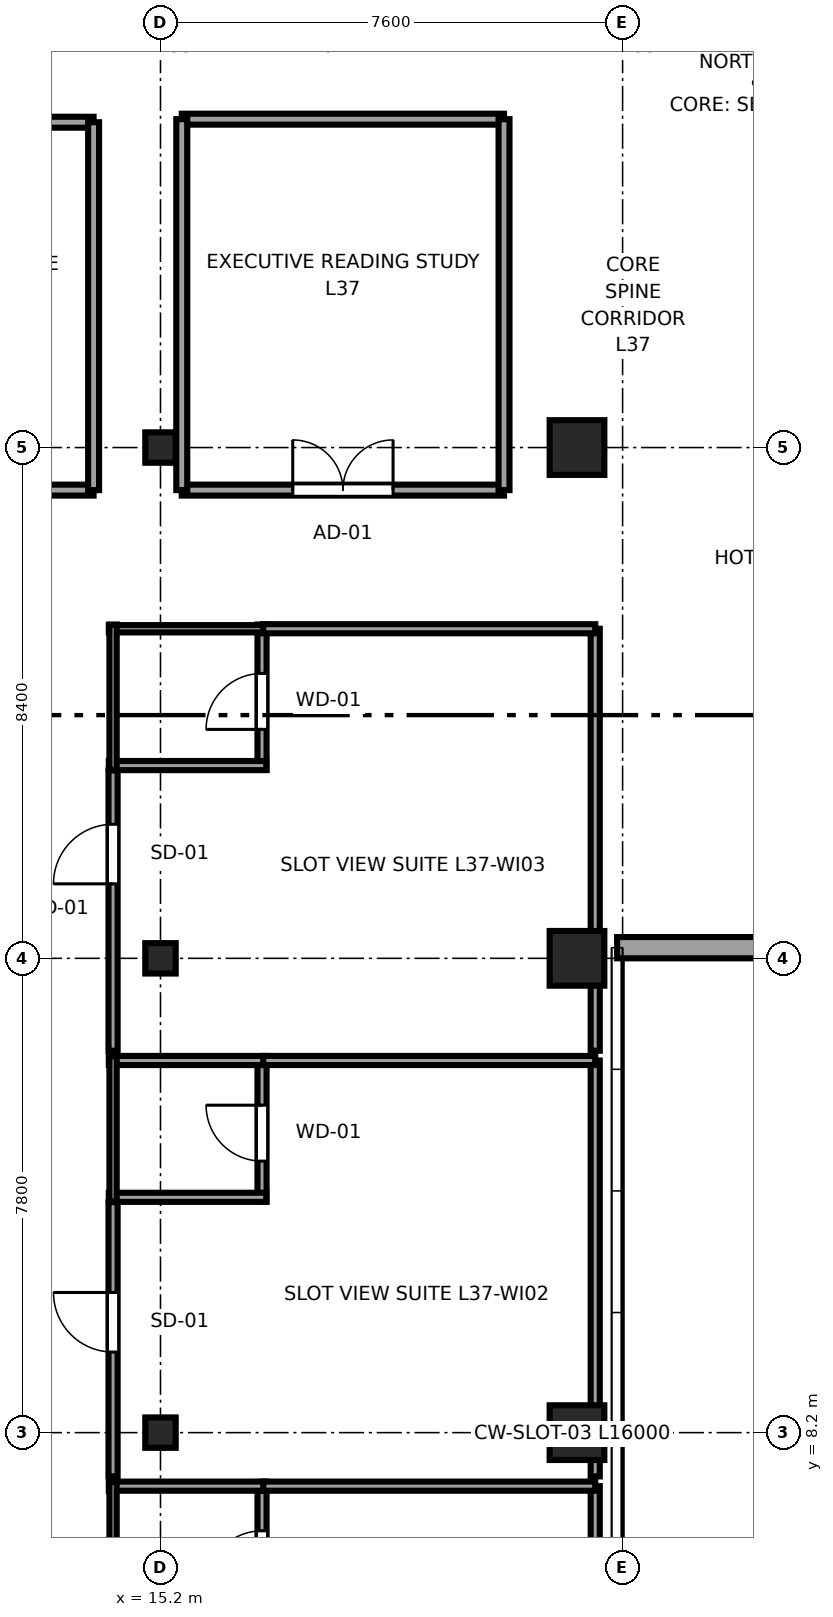
"""IFC4 building model, lengths in metres.
Left out: names, types, materials, properties, quantities, classifications, styles, units other than length and angle.
Written with IfcOpenShell. Run it as: python <this file> out.ifc"""

import sys

from ifc_helpers import new_model, si_unit, direction, frame, frame_2d, origin, origin_2d, place, context, subcontext, project, spatial, rectangle, i_section, extrude, source, transform, mapped, element, fill, save


model = new_model("IFC4")
c1 = context("Model", 3, precision=1e-05, world=origin(), true_north=direction((0.0, 1.0)))
c2 = subcontext(c1, "Body", "Model", "MODEL_VIEW")
j1 = project(units=[si_unit("LENGTHUNIT", "METRE"), si_unit("PLANEANGLEUNIT", "RADIAN")], contexts=[c1])
p1 = place(None, origin())
s1 = spatial("IfcSite", under=j1, at=p1, CompositionType="ELEMENT")
p2 = place(p1, origin())
s2 = spatial("IfcBuilding", under=s1, at=p2, CompositionType="ELEMENT")
p3 = place(p2, frame((0.0, 0.0, 143.5)))
s3 = spatial("IfcBuildingStorey", under=s2, at=p3, CompositionType="ELEMENT", Elevation=143.5)
m1 = source(origin(), c2, "Body", "SweptSolid", [
    extrude(i_section(OverallWidth=0.5, OverallDepth=0.5, WebThickness=0.022, FlangeThickness=0.034, at=origin_2d()), origin(), (0.0, 0.0, 1.0), 3.55),
])
for number, where, z_axis, x_axis in (
    (1, (15.2, 8.2, 0.0), (0.0, 0.0, 1.0), (1.0, 0.0, 0.0)),
    (2, (15.2, 16.0, 0.0), (0.0, 0.0, 1.0), (1.0, 0.0, 0.0)),
    (3, (15.2, 24.4, 0.0), (0.0, 0.0, 1.0), (1.0, 0.0, 0.0)),
):
    element("IfcColumn", number, at=place(p3, frame(where, z_axis=z_axis, x_axis=x_axis)), inside=s3, PredefinedType="COLUMN", context=c2, shape_type="MappedRepresentation", body=[
        mapped(m1, transform((0.0, 0.0, 0.0), x_axis=(1.0, 0.0, 0.0), y_axis=(0.0, 1.0, 0.0), z_axis=(0.0, 0.0, 1.0), scale=1.0)),
    ])
m2 = source(origin(), c2, "Body", "SweptSolid", [
    extrude(rectangle(XDim=0.9, YDim=0.9, at=origin_2d()), origin(), (0.0, 0.0, 1.0), 3.55),
])
for number, where, z_axis, x_axis in (
    (4, (22.05, 8.2, 0.0), (0.0, 0.0, 1.0), (1.0, 0.0, 0.0)),
    (5, (22.05, 16.0, 0.0), (0.0, 0.0, 1.0), (1.0, 0.0, 0.0)),
    (6, (22.05, 24.4, 0.0), (0.0, 0.0, 1.0), (1.0, 0.0, 0.0)),
):
    element("IfcColumn", number, at=place(p3, frame(where, z_axis=z_axis, x_axis=x_axis)), inside=s3, PredefinedType="COLUMN", context=c2, shape_type="MappedRepresentation", body=[
        mapped(m2, transform((0.0, 0.0, 0.0), x_axis=(1.0, 0.0, 0.0), y_axis=(0.0, 1.0, 0.0), z_axis=(0.0, 0.0, 1.0), scale=1.0)),
    ])
p4 = place(p3, frame((22.71, 16.175, 0.0), z_axis=(0.0, 0.0, 1.0), x_axis=(1.0, 0.0, 0.0)))
e7 = element("IfcWall", 7, at=p4, inside=s3, PredefinedType="SOLIDWALL", context=c2, shape_type="SweptSolid", body=[
    extrude(rectangle(XDim=11.58, YDim=0.35, at=frame_2d((5.79, 0.0))), origin(), (0.0, 0.0, 1.0), 2.08),
])
p5 = place(p3, frame((16.87, 5.0, 0.0), z_axis=(0.0, 0.0, 1.0), x_axis=(0.0, 1.0, 0.0)))
e8 = element("IfcWall", 8, at=p5, inside=s3, PredefinedType="PARTITIONING", context=c2, shape_type="SweptSolid", body=[
    extrude(rectangle(XDim=2.39, YDim=0.15, at=frame_2d((1.195, 0.0))), origin(), (0.0, 0.0, 1.0), 3.29),
])
p6 = place(p5, frame((0.665, 0.0, 0.0)))
e9 = element("IfcOpeningElement", 9, at=p6, cuts=e8, PredefinedType="OPENING", context=c2, shape_type="SweptSolid", body=[
    extrude(rectangle(XDim=0.92, YDim=2.01, at=frame_2d((0.46, 1.005))), frame((0.0, 0.085, 0.0), z_axis=(0.0, -1.0, 0.0), x_axis=(1.0, 0.0, 0.0)), (0.0, 0.0, 1.0), 0.17),
])
p7 = place(p3, frame((14.35, 7.32, 0.0), z_axis=(0.0, 0.0, 1.0), x_axis=(1.0, 0.0, 0.0)))
e10 = element("IfcWall", 10, at=p7, inside=s3, PredefinedType="PARTITIONING", context=c2, shape_type="SweptSolid", body=[
    extrude(rectangle(XDim=2.59, YDim=0.15, at=frame_2d((1.295, 0.0))), origin(), (0.0, 0.0, 1.0), 3.29),
])
p8 = place(p3, frame((14.42, 5.0, 0.0), z_axis=(0.0, 0.0, 1.0), x_axis=(0.0, 1.0, 0.0)))
e11 = element("IfcWall", 11, at=p8, inside=s3, PredefinedType="PLUMBINGWALL", context=c2, shape_type="SweptSolid", body=[
    extrude(rectangle(XDim=2.39, YDim=0.12, at=frame_2d((1.195, 0.0))), origin(), (0.0, 0.0, 1.0), 3.29),
])
p9 = place(p3, frame((16.87, 12.0, 0.0), z_axis=(0.0, 0.0, 1.0), x_axis=(0.0, 1.0, 0.0)))
e12 = element("IfcWall", 12, at=p9, inside=s3, PredefinedType="PARTITIONING", context=c2, shape_type="SweptSolid", body=[
    extrude(rectangle(XDim=2.39, YDim=0.15, at=frame_2d((1.195, 0.0))), origin(), (0.0, 0.0, 1.0), 3.29),
])
p10 = place(p9, frame((0.665, 0.0, 0.0)))
e13 = element("IfcOpeningElement", 13, at=p10, cuts=e12, PredefinedType="OPENING", context=c2, shape_type="SweptSolid", body=[
    extrude(rectangle(XDim=0.92, YDim=2.01, at=frame_2d((0.46, 1.005))), frame((0.0, 0.085, 0.0), z_axis=(0.0, -1.0, 0.0), x_axis=(1.0, 0.0, 0.0)), (0.0, 0.0, 1.0), 0.17),
])
for number, where, z_axis, x_axis in (
    (14, (14.35, 12.07, 0.0), (0.0, 0.0, 1.0), (1.0, 0.0, 0.0)),
    (15, (14.35, 14.32, 0.0), (0.0, 0.0, 1.0), (1.0, 0.0, 0.0)),
):
    element("IfcWall", number, at=place(p3, frame(where, z_axis=z_axis, x_axis=x_axis)), inside=s3, PredefinedType="PARTITIONING", context=c2, shape_type="SweptSolid", body=[
        extrude(rectangle(XDim=2.59, YDim=0.15, at=frame_2d((1.295, 0.0))), origin(), (0.0, 0.0, 1.0), 3.29),
    ])
p11 = place(p3, frame((14.42, 12.0, 0.0), z_axis=(0.0, 0.0, 1.0), x_axis=(0.0, 1.0, 0.0)))
e16 = element("IfcWall", 16, at=p11, inside=s3, PredefinedType="PLUMBINGWALL", context=c2, shape_type="SweptSolid", body=[
    extrude(rectangle(XDim=2.39, YDim=0.12, at=frame_2d((1.195, 0.0))), origin(), (0.0, 0.0, 1.0), 3.29),
])
p12 = place(p3, frame((16.87, 19.1, 0.0), z_axis=(0.0, 0.0, 1.0), x_axis=(0.0, 1.0, 0.0)))
e17 = element("IfcWall", 17, at=p12, inside=s3, PredefinedType="PARTITIONING", context=c2, shape_type="SweptSolid", body=[
    extrude(rectangle(XDim=2.39, YDim=0.15, at=frame_2d((1.195, 0.0))), origin(), (0.0, 0.0, 1.0), 3.29),
])
p13 = place(p12, frame((0.665, 0.0, 0.0)))
e18 = element("IfcOpeningElement", 18, at=p13, cuts=e17, PredefinedType="OPENING", context=c2, shape_type="SweptSolid", body=[
    extrude(rectangle(XDim=0.92, YDim=2.01, at=frame_2d((0.46, 1.005))), frame((0.0, 0.085, 0.0), z_axis=(0.0, -1.0, 0.0), x_axis=(1.0, 0.0, 0.0)), (0.0, 0.0, 1.0), 0.17),
])
p14 = place(p3, frame((14.35, 19.17, 0.0), z_axis=(0.0, 0.0, 1.0), x_axis=(1.0, 0.0, 0.0)))
e19 = element("IfcWall", 19, at=p14, inside=s3, PredefinedType="PARTITIONING", context=c2, shape_type="SweptSolid", body=[
    extrude(rectangle(XDim=2.59, YDim=0.15, at=frame_2d((1.295, 0.0))), origin(), (0.0, 0.0, 1.0), 3.29),
])
p15 = place(p3, frame((14.35, 21.42, 0.0), z_axis=(0.0, 0.0, 1.0), x_axis=(1.0, 0.0, 0.0)))
e20 = element("IfcWall", 20, at=p15, inside=s3, PredefinedType="PLUMBINGWALL", context=c2, shape_type="SweptSolid", body=[
    extrude(rectangle(XDim=2.59, YDim=0.12, at=frame_2d((1.295, 0.0))), origin(), (0.0, 0.0, 1.0), 3.29),
])
p16 = place(p3, frame((14.42, 19.1, 0.0), z_axis=(0.0, 0.0, 1.0), x_axis=(0.0, 1.0, 0.0)))
e21 = element("IfcWall", 21, at=p16, inside=s3, PredefinedType="PLUMBINGWALL", context=c2, shape_type="SweptSolid", body=[
    extrude(rectangle(XDim=2.39, YDim=0.12, at=frame_2d((1.195, 0.0))), origin(), (0.0, 0.0, 1.0), 3.29),
])
p17 = place(p3, frame((22.35, 0.405, 0.0), z_axis=(0.0, 0.0, 1.0), x_axis=(0.0, 1.0, 0.0)))
e22 = element("IfcWall", 22, at=p17, inside=s3, PredefinedType="PARTITIONING", context=c2, shape_type="SweptSolid", body=[
    extrude(rectangle(XDim=6.915, YDim=0.15, at=frame_2d((3.458, 0.0))), origin(), (0.0, 0.0, 1.0), 2.08),
])
p18 = place(p3, frame((16.89, 7.32, 0.0), z_axis=(0.0, 0.0, 1.0), x_axis=(1.0, 0.0, 0.0)))
e23 = element("IfcWall", 23, at=p18, inside=s3, PredefinedType="PARTITIONING", context=c2, shape_type="SweptSolid", body=[
    extrude(rectangle(XDim=5.46, YDim=0.15, at=frame_2d((2.73, 0.0))), origin(), (0.0, 0.0, 1.0), 3.29),
])
p19 = place(p3, frame((14.42, 7.48, 0.0), z_axis=(0.0, 0.0, 1.0), x_axis=(0.0, 1.0, 0.0)))
e24 = element("IfcWall", 24, at=p19, inside=s3, PredefinedType="PARTITIONING", context=c2, shape_type="SweptSolid", body=[
    extrude(rectangle(XDim=4.51, YDim=0.15, at=frame_2d((2.255, 0.0))), origin(), (0.0, 0.0, 1.0), 3.29),
])
p20 = place(p19, frame((2.045, 0.0, 0.0)))
e25 = element("IfcOpeningElement", 25, at=p20, cuts=e24, PredefinedType="OPENING", context=c2, shape_type="SweptSolid", body=[
    extrude(rectangle(XDim=0.98, YDim=2.12, at=frame_2d((0.49, 1.06))), frame((0.0, 0.085, 0.0), z_axis=(0.0, -1.0, 0.0), x_axis=(1.0, 0.0, 0.0)), (0.0, 0.0, 1.0), 0.17),
])
p21 = place(p3, frame((22.35, 7.48, 0.0), z_axis=(0.0, 0.0, 1.0), x_axis=(0.0, 1.0, 0.0)))
e26 = element("IfcWall", 26, at=p21, inside=s3, PredefinedType="PARTITIONING", context=c2, shape_type="SweptSolid", body=[
    extrude(rectangle(XDim=6.84, YDim=0.15, at=frame_2d((3.42, 0.0))), origin(), (0.0, 0.0, 1.0), 2.08),
])
p22 = place(p3, frame((16.89, 14.32, 0.0), z_axis=(0.0, 0.0, 1.0), x_axis=(1.0, 0.0, 0.0)))
e27 = element("IfcWall", 27, at=p22, inside=s3, PredefinedType="PARTITIONING", context=c2, shape_type="SweptSolid", body=[
    extrude(rectangle(XDim=5.46, YDim=0.15, at=frame_2d((2.73, 0.0))), origin(), (0.0, 0.0, 1.0), 3.29),
])
p23 = place(p3, frame((14.42, 14.48, 0.0), z_axis=(0.0, 0.0, 1.0), x_axis=(0.0, 1.0, 0.0)))
e28 = element("IfcWall", 28, at=p23, inside=s3, PredefinedType="PARTITIONING", context=c2, shape_type="SweptSolid", body=[
    extrude(rectangle(XDim=4.61, YDim=0.15, at=frame_2d((2.305, 0.0))), origin(), (0.0, 0.0, 1.0), 3.29),
])
p24 = place(p23, frame((2.745, 0.0, 0.0)))
e29 = element("IfcOpeningElement", 29, at=p24, cuts=e28, PredefinedType="OPENING", context=c2, shape_type="SweptSolid", body=[
    extrude(rectangle(XDim=0.98, YDim=2.12, at=frame_2d((0.49, 1.06))), frame((0.0, 0.085, 0.0), z_axis=(0.0, -1.0, 0.0), x_axis=(1.0, 0.0, 0.0)), (0.0, 0.0, 1.0), 0.17),
])
p25 = place(p3, frame((22.35, 14.48, 0.0), z_axis=(0.0, 0.0, 1.0), x_axis=(0.0, 1.0, 0.0)))
e30 = element("IfcWall", 30, at=p25, inside=s3, PredefinedType="PARTITIONING", context=c2, shape_type="SweptSolid", body=[
    extrude(rectangle(XDim=6.94, YDim=0.15, at=frame_2d((3.47, 0.0))), origin(), (0.0, 0.0, 1.0), 2.08),
])
p26 = place(p3, frame((16.89, 21.42, 0.0), z_axis=(0.0, 0.0, 1.0), x_axis=(1.0, 0.0, 0.0)))
e31 = element("IfcWall", 31, at=p26, inside=s3, PredefinedType="PARTITIONING", context=c2, shape_type="SweptSolid", body=[
    extrude(rectangle(XDim=5.46, YDim=0.15, at=frame_2d((2.73, 0.0))), origin(), (0.0, 0.0, 1.0), 3.29),
])
p27 = place(p3, frame((9.88, 23.7, 0.0), z_axis=(0.0, 0.0, 1.0), x_axis=(1.0, 0.0, 0.0)))
e32 = element("IfcWall", 32, at=p27, inside=s3, PredefinedType="PARTITIONING", context=c2, shape_type="SweptSolid", body=[
    extrude(rectangle(XDim=4.22, YDim=0.18, at=frame_2d((2.11, 0.0))), origin(), (0.0, 0.0, 1.0), 3.29),
])
p28 = place(p27, frame((1.285, 0.0, 0.0)))
e33 = element("IfcOpeningElement", 33, at=p28, cuts=e32, PredefinedType="OPENING", context=c2, shape_type="SweptSolid", body=[
    extrude(rectangle(XDim=1.65, YDim=2.15, at=frame_2d((0.825, 1.075))), frame((0.0, 0.1, 0.0), z_axis=(0.0, -1.0, 0.0), x_axis=(1.0, 0.0, 0.0)), (0.0, 0.0, 1.0), 0.2),
])
p29 = place(p3, frame((9.88, 29.75, 0.0), z_axis=(0.0, 0.0, 1.0), x_axis=(1.0, 0.0, 0.0)))
e34 = element("IfcWall", 34, at=p29, inside=s3, PredefinedType="PARTITIONING", context=c2, shape_type="SweptSolid", body=[
    extrude(rectangle(XDim=4.22, YDim=0.18, at=frame_2d((2.11, 0.0))), origin(), (0.0, 0.0, 1.0), 3.29),
])
p30 = place(p3, frame((14.1, 23.7, 0.0), z_axis=(0.0, 0.0, 1.0), x_axis=(0.0, 1.0, 0.0)))
e35 = element("IfcWall", 35, at=p30, inside=s3, PredefinedType="PARTITIONING", context=c2, shape_type="SweptSolid", body=[
    extrude(rectangle(XDim=6.05, YDim=0.18, at=frame_2d((3.025, 0.0))), origin(), (0.0, 0.0, 1.0), 3.29),
])
p31 = place(p3, frame((15.55, 23.7, 0.0), z_axis=(0.0, 0.0, 1.0), x_axis=(1.0, 0.0, 0.0)))
e36 = element("IfcWall", 36, at=p31, inside=s3, PredefinedType="PARTITIONING", context=c2, shape_type="SweptSolid", body=[
    extrude(rectangle(XDim=5.3, YDim=0.18, at=frame_2d((2.65, 0.0))), origin(), (0.0, 0.0, 1.0), 3.29),
])
p32 = place(p31, frame((1.825, 0.0, 0.0)))
e37 = element("IfcOpeningElement", 37, at=p32, cuts=e36, PredefinedType="OPENING", context=c2, shape_type="SweptSolid", body=[
    extrude(rectangle(XDim=1.65, YDim=2.15, at=frame_2d((0.825, 1.075))), frame((0.0, 0.1, 0.0), z_axis=(0.0, -1.0, 0.0), x_axis=(1.0, 0.0, 0.0)), (0.0, 0.0, 1.0), 0.2),
])
p33 = place(p3, frame((15.55, 29.8, 0.0), z_axis=(0.0, 0.0, 1.0), x_axis=(1.0, 0.0, 0.0)))
e38 = element("IfcWall", 38, at=p33, inside=s3, PredefinedType="PARTITIONING", context=c2, shape_type="SweptSolid", body=[
    extrude(rectangle(XDim=5.3, YDim=0.18, at=frame_2d((2.65, 0.0))), origin(), (0.0, 0.0, 1.0), 3.29),
])
for number, where, z_axis, x_axis in (
    (39, (15.55, 23.7, 0.0), (0.0, 0.0, 1.0), (0.0, 1.0, 0.0)),
    (40, (20.85, 23.7, 0.0), (0.0, 0.0, 1.0), (0.0, 1.0, 0.0)),
):
    element("IfcWall", number, at=place(p3, frame(where, z_axis=z_axis, x_axis=x_axis)), inside=s3, PredefinedType="PARTITIONING", context=c2, shape_type="SweptSolid", body=[
        extrude(rectangle(XDim=6.1, YDim=0.18, at=frame_2d((3.05, 0.0))), origin(), (0.0, 0.0, 1.0), 3.29),
    ])
m3 = source(origin(), c2, "Body", "SweptSolid", [
    extrude(rectangle(XDim=0.92, YDim=2.01, at=frame_2d((0.46, 1.005))), frame((0.0, 0.025, 0.0), z_axis=(0.0, -1.0, 0.0), x_axis=(1.0, 0.0, 0.0)), (0.0, 0.0, 1.0), 0.05),
])
p34 = place(p6, origin())
e41 = element("IfcDoor", 41, at=p34, inside=s3, OperationType="SINGLE_SWING_LEFT", PredefinedType="DOOR", context=c2, shape_type="MappedRepresentation", body=[
    mapped(m3, transform((0.0, 0.0, 0.0), x_axis=(1.0, 0.0, 0.0), y_axis=(0.0, 1.0, 0.0), z_axis=(0.0, 0.0, 1.0), scale=1.0)),
])
fill(e9, e41)
p35 = place(p10, origin())
e42 = element("IfcDoor", 42, at=p35, inside=s3, OperationType="SINGLE_SWING_RIGHT", PredefinedType="DOOR", context=c2, shape_type="MappedRepresentation", body=[
    mapped(m3, transform((0.0, 0.0, 0.0), x_axis=(1.0, 0.0, 0.0), y_axis=(0.0, 1.0, 0.0), z_axis=(0.0, 0.0, 1.0), scale=1.0)),
])
fill(e13, e42)
p36 = place(p13, origin())
e43 = element("IfcDoor", 43, at=p36, inside=s3, OperationType="SINGLE_SWING_LEFT", PredefinedType="DOOR", context=c2, shape_type="MappedRepresentation", body=[
    mapped(m3, transform((0.0, 0.0, 0.0), x_axis=(1.0, 0.0, 0.0), y_axis=(0.0, 1.0, 0.0), z_axis=(0.0, 0.0, 1.0), scale=1.0)),
])
fill(e18, e43)
m4 = source(origin(), c2, "Body", "SweptSolid", [
    extrude(rectangle(XDim=0.98, YDim=2.12, at=frame_2d((0.49, 1.06))), frame((0.0, 0.025, 0.0), z_axis=(0.0, -1.0, 0.0), x_axis=(1.0, 0.0, 0.0)), (0.0, 0.0, 1.0), 0.05),
])
p37 = place(p20, origin())
e44 = element("IfcDoor", 44, at=p37, inside=s3, OperationType="SINGLE_SWING_RIGHT", PredefinedType="DOOR", context=c2, shape_type="MappedRepresentation", body=[
    mapped(m4, transform((0.0, 0.0, 0.0), x_axis=(1.0, 0.0, 0.0), y_axis=(0.0, 1.0, 0.0), z_axis=(0.0, 0.0, 1.0), scale=1.0)),
])
fill(e25, e44)
p38 = place(p24, origin())
e45 = element("IfcDoor", 45, at=p38, inside=s3, OperationType="SINGLE_SWING_LEFT", PredefinedType="DOOR", context=c2, shape_type="MappedRepresentation", body=[
    mapped(m4, transform((0.0, 0.0, 0.0), x_axis=(1.0, 0.0, 0.0), y_axis=(0.0, 1.0, 0.0), z_axis=(0.0, 0.0, 1.0), scale=1.0)),
])
fill(e29, e45)
m5 = source(origin(), c2, "Body", "SweptSolid", [
    extrude(rectangle(XDim=1.65, YDim=2.15, at=frame_2d((0.825, 1.075))), frame((0.0, 0.025, 0.0), z_axis=(0.0, -1.0, 0.0), x_axis=(1.0, 0.0, 0.0)), (0.0, 0.0, 1.0), 0.05),
])
p39 = place(p32, origin())
e46 = element("IfcDoor", 46, at=p39, inside=s3, OperationType="DOUBLE_DOOR_SINGLE_SWING", PredefinedType="DOOR", context=c2, shape_type="MappedRepresentation", body=[
    mapped(m5, transform((0.0, 0.0, 0.0), x_axis=(1.0, 0.0, 0.0), y_axis=(0.0, 1.0, 0.0), z_axis=(0.0, 0.0, 1.0), scale=1.0)),
])
fill(e37, e46)
save(model, sys.argv[1])
